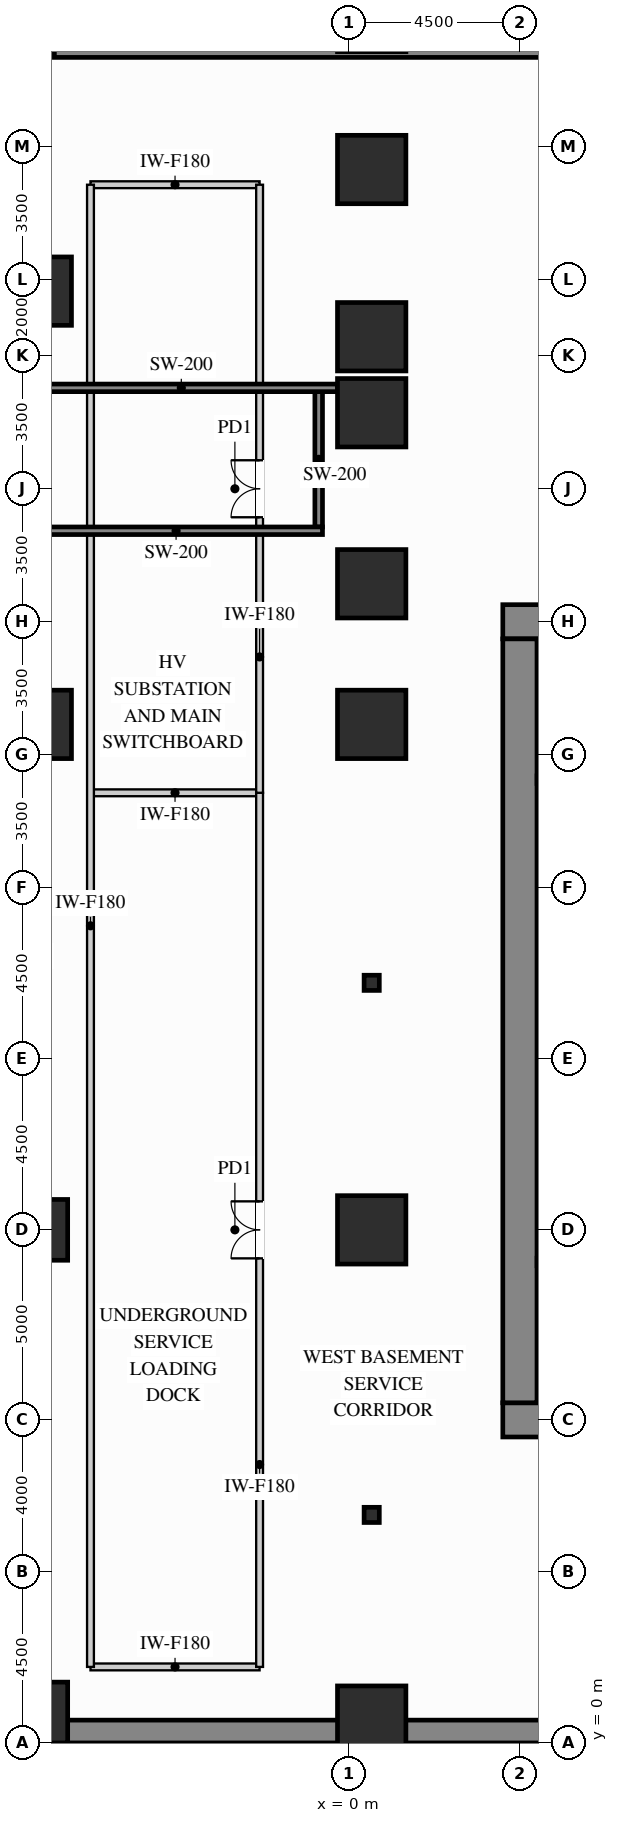
"""IFC4 building model, lengths in metres.
Left out: names, types, materials, properties, quantities, classifications, styles, units other than length and angle.
Written with IfcOpenShell. Run it as: python <this file> out.ifc"""

import sys

from ifc_helpers import new_model, si_unit, direction, frame, frame_2d, origin, origin_2d, place, context, subcontext, project, spatial, rectangle, hollow_rectangle, extrude, source, transform, mapped, element, fill, save


model = new_model("IFC4")
c1 = context("Model", 3, precision=1e-05, world=origin(), true_north=direction((0.0, 1.0)))
c2 = subcontext(c1, "Body", "Model", "MODEL_VIEW")
j1 = project(units=[si_unit("LENGTHUNIT", "METRE"), si_unit("PLANEANGLEUNIT", "RADIAN")], contexts=[c1])
p1 = place(None, origin())
s1 = spatial("IfcSite", under=j1, at=p1, CompositionType="ELEMENT")
p2 = place(p1, origin())
s2 = spatial("IfcBuilding", under=s1, at=p2, CompositionType="ELEMENT")
p3 = place(p2, frame((0.0, 0.0, -4.5)))
s3 = spatial("IfcBuildingStorey", under=s2, at=p3, CompositionType="ELEMENT", Elevation=-4.5)
m1 = source(origin(), c2, "Body", "SweptSolid", [
    extrude(rectangle(XDim=1.6, YDim=1.6, at=origin_2d()), origin(), (0.0, 0.0, 1.0), 4.24),
])
for number, where, z_axis, x_axis in (
    (1, (-8.2, 0.8, 0.0), (0.0, 0.0, 1.0), (1.0, 0.0, 0.0)),
    (2, (-8.2, 13.5, 0.0), (0.0, 0.0, 1.0), (1.0, 0.0, 0.0)),
):
    element("IfcColumn", number, at=place(p3, frame(where, z_axis=z_axis, x_axis=x_axis)), inside=s3, PredefinedType="COLUMN", context=c2, shape_type="MappedRepresentation", body=[
        mapped(m1, transform((0.0, 0.0, 0.0), x_axis=(1.0, 0.0, 0.0), y_axis=(0.0, 1.0, 0.0), z_axis=(0.0, 0.0, 1.0))),
    ])
m2 = source(origin(), c2, "Body", "SweptSolid", [
    extrude(rectangle(XDim=1.8, YDim=1.8, at=origin_2d()), origin(), (0.0, 0.0, 1.0), 4.24),
])
for number, where, z_axis, x_axis in (
    (3, (-8.2, 26.8, 0.0), (0.0, 0.0, 1.0), (1.0, 0.0, 0.0)),
    (4, (-8.2, 38.2, 0.0), (0.0, 0.0, 1.0), (1.0, 0.0, 0.0)),
    (5, (0.6, 0.6, 0.0), (0.0, 0.0, 1.0), (1.0, 0.0, 0.0)),
    (6, (0.6, 13.5, 0.0), (0.0, 0.0, 1.0), (1.0, 0.0, 0.0)),
    (7, (0.6, 26.8, 0.0), (0.0, 0.0, 1.0), (1.0, 0.0, 0.0)),
    (8, (0.6, 30.5, 0.0), (0.0, 0.0, 1.0), (1.0, 0.0, 0.0)),
    (9, (0.6, 35.0, 0.0), (0.0, 0.0, 1.0), (1.0, 0.0, 0.0)),
    (10, (0.6, 37.0, 0.0), (0.0, 0.0, 1.0), (1.0, 0.0, 0.0)),
    (11, (0.6, 41.4, 0.0), (0.0, 0.0, 1.0), (1.0, 0.0, 0.0)),
    (12, (0.6, 45.4, 0.0), (0.0, 0.0, 1.0), (1.0, 0.0, 0.0)),
):
    element("IfcColumn", number, at=place(p3, frame(where, z_axis=z_axis, x_axis=x_axis)), inside=s3, PredefinedType="COLUMN", context=c2, shape_type="MappedRepresentation", body=[
        mapped(m2, transform((0.0, 0.0, 0.0), x_axis=(1.0, 0.0, 0.0), y_axis=(0.0, 1.0, 0.0), z_axis=(0.0, 0.0, 1.0))),
    ])
m3 = source(origin(), c2, "Body", "SweptSolid", [
    extrude(hollow_rectangle(XDim=0.4, YDim=0.4, WallThickness=0.02, at=origin_2d()), origin(), (0.0, 0.0, 1.0), 4.24),
])
for number, where, z_axis, x_axis in (
    (13, (0.6, 6.0, 0.0), (0.0, 0.0, 1.0), (1.0, 0.0, 0.0)),
    (14, (0.6, 20.0, 0.0), (0.0, 0.0, 1.0), (1.0, 0.0, 0.0)),
):
    element("IfcColumn", number, at=place(p3, frame(where, z_axis=z_axis, x_axis=x_axis)), inside=s3, PredefinedType="PILASTER", context=c2, shape_type="MappedRepresentation", body=[
        mapped(m3, transform((0.0, 0.0, 0.0), x_axis=(1.0, 0.0, 0.0), y_axis=(0.0, 1.0, 0.0), z_axis=(0.0, 0.0, 1.0))),
    ])
m4 = source(origin(), c2, "Body", "SweptSolid", [
    extrude(rectangle(XDim=10.9, YDim=0.9, at=frame_2d((5.45, 0.0))), origin(), (0.0, 0.0, 1.0), 4.24),
])
for number, where, z_axis, x_axis in (
    (15, (4.05, 29.5, 0.0), (0.0, 0.0, 1.0), (1.0, 0.0, 0.0)),
    (16, (4.05, 8.5, 0.0), (0.0, 0.0, 1.0), (1.0, 0.0, 0.0)),
):
    element("IfcWall", number, at=place(p3, frame(where, z_axis=z_axis, x_axis=x_axis)), inside=s3, PredefinedType="SHEAR", context=c2, shape_type="MappedRepresentation", body=[
        mapped(m4, transform((0.0, 0.0, 0.0), x_axis=(1.0, 0.0, 0.0), y_axis=(0.0, 1.0, 0.0), z_axis=(0.0, 0.0, 1.0))),
    ])
m5 = source(origin(), c2, "Body", "SweptSolid", [
    extrude(rectangle(XDim=20.1, YDim=0.9, at=frame_2d((10.05, 0.0))), origin(), (0.0, 0.0, 1.0), 4.24),
])
p4 = place(p3, frame((4.5, 8.95, 0.0), z_axis=(0.0, 0.0, 1.0), x_axis=(0.0, 1.0, 0.0)))
e17 = element("IfcWall", 17, at=p4, inside=s3, PredefinedType="SHEAR", context=c2, shape_type="MappedRepresentation", body=[
    mapped(m5, transform((0.0, 0.0, 0.0), x_axis=(1.0, 0.0, 0.0), y_axis=(0.0, 1.0, 0.0), z_axis=(0.0, 0.0, 1.0))),
])
m6 = source(origin(), c2, "Body", "SweptSolid", [
    extrude(rectangle(XDim=4.45, YDim=0.18, at=frame_2d((2.225, 0.0))), origin(), (0.0, 0.0, 1.0), 4.225),
])
for number, where, z_axis, x_axis in (
    (18, (-6.8, 25.0, 0.0), (0.0, 0.0, 1.0), (1.0, 0.0, 0.0)),
    (19, (-6.8, 41.0, 0.0), (0.0, 0.0, 1.0), (1.0, 0.0, 0.0)),
    (20, (-6.8, 2.0, 0.0), (0.0, 0.0, 1.0), (1.0, 0.0, 0.0)),
):
    element("IfcWall", number, at=place(p3, frame(where, z_axis=z_axis, x_axis=x_axis)), inside=s3, PredefinedType="PARTITIONING", context=c2, shape_type="MappedRepresentation", body=[
        mapped(m6, transform((0.0, 0.0, 0.0), x_axis=(1.0, 0.0, 0.0), y_axis=(0.0, 1.0, 0.0), z_axis=(0.0, 0.0, 1.0))),
    ])
p5 = place(p3, frame((-2.35, 2.0, 0.0), z_axis=(0.0, 0.0, 1.0), x_axis=(0.0, 1.0, 0.0)))
e21 = element("IfcWall", 21, at=p5, inside=s3, PredefinedType="PARTITIONING", context=c2, shape_type="SweptSolid", body=[
    extrude(rectangle(XDim=23.0, YDim=0.18, at=frame_2d((11.5, 0.0))), origin(), (0.0, 0.0, 1.0), 4.225),
])
p6 = place(p5, frame((10.75, 0.0, 0.0)))
e22 = element("IfcOpeningElement", 22, at=p6, cuts=e21, PredefinedType="OPENING", context=c2, shape_type="SweptSolid", body=[
    extrude(rectangle(XDim=1.5, YDim=2.2, at=frame_2d((0.75, 1.1))), frame((0.0, 0.1, 0.0), z_axis=(0.0, -1.0, 0.0), x_axis=(1.0, 0.0, 0.0)), (0.0, 0.0, 1.0), 0.2),
])
p7 = place(p3, frame((-2.35, 25.0, 0.0), z_axis=(0.0, 0.0, 1.0), x_axis=(0.0, 1.0, 0.0)))
e23 = element("IfcWall", 23, at=p7, inside=s3, PredefinedType="PARTITIONING", context=c2, shape_type="SweptSolid", body=[
    extrude(rectangle(XDim=16.0, YDim=0.18, at=frame_2d((8.0, 0.0))), origin(), (0.0, 0.0, 1.0), 4.225),
])
p8 = place(p7, frame((7.25, 0.0, 0.0)))
e24 = element("IfcOpeningElement", 24, at=p8, cuts=e23, PredefinedType="OPENING", context=c2, shape_type="SweptSolid", body=[
    extrude(rectangle(XDim=1.5, YDim=2.2, at=frame_2d((0.75, 1.1))), frame((0.0, 0.1, 0.0), z_axis=(0.0, -1.0, 0.0), x_axis=(1.0, 0.0, 0.0)), (0.0, 0.0, 1.0), 0.2),
])
m7 = source(origin(), c2, "Body", "SweptSolid", [
    extrude(rectangle(XDim=39.0, YDim=0.18, at=frame_2d((19.5, 0.0))), origin(), (0.0, 0.0, 1.0), 4.225),
])
p9 = place(p3, frame((-6.8, 2.0, 0.0), z_axis=(0.0, 0.0, 1.0), x_axis=(0.0, 1.0, 0.0)))
e25 = element("IfcWall", 25, at=p9, inside=s3, PredefinedType="PARTITIONING", context=c2, shape_type="MappedRepresentation", body=[
    mapped(m7, transform((0.0, 0.0, 0.0), x_axis=(1.0, 0.0, 0.0), y_axis=(0.0, 1.0, 0.0), z_axis=(0.0, 0.0, 1.0))),
])
m8 = source(origin(), c2, "Body", "SweptSolid", [
    extrude(rectangle(XDim=2.17, YDim=0.18, at=frame_2d((1.085, 0.0))), origin(), (0.0, 0.0, 1.0), 4.225),
])
p10 = place(p3, frame((4.98, 20.92, 0.0), z_axis=(0.0, 0.0, 1.0), x_axis=(1.0, 0.0, 0.0)))
e26 = element("IfcWall", 26, at=p10, inside=s3, PredefinedType="PARTITIONING", context=c2, shape_type="MappedRepresentation", body=[
    mapped(m8, transform((0.0, 0.0, 0.0), x_axis=(1.0, 0.0, 0.0), y_axis=(0.0, 1.0, 0.0), z_axis=(0.0, 0.0, 1.0))),
])
m9 = source(origin(), c2, "Body", "SweptSolid", [
    extrude(rectangle(XDim=84.0, YDim=0.6, at=frame_2d((42.0, 0.0))), origin(), (0.0, 0.0, 1.0), 4.24),
])
p11 = place(p3, frame((-9.0, 0.3, 0.0), z_axis=(0.0, 0.0, 1.0), x_axis=(1.0, 0.0, 0.0)))
e27 = element("IfcWall", 27, at=p11, inside=s3, PredefinedType="USERDEFINED", context=c2, shape_type="MappedRepresentation", body=[
    mapped(m9, transform((0.0, 0.0, 0.0), x_axis=(1.0, 0.0, 0.0), y_axis=(0.0, 1.0, 0.0), z_axis=(0.0, 0.0, 1.0))),
])
p12 = place(p3, frame((4.952, 12.655, 0.0), z_axis=(0.0, 0.0, 1.0), x_axis=(1.0, 0.0, 0.0)))
e28 = element("IfcWall", 28, at=p12, inside=s3, PredefinedType="SHEAR", context=c2, shape_type="SweptSolid", body=[
    extrude(rectangle(XDim=7.453, YDim=0.2, at=frame_2d((3.727, 0.0))), origin(), (0.0, 0.0, 1.0), 4.24),
])
p13 = place(p12, frame((0.4, 0.0, 0.0)))
e29 = element("IfcOpeningElement", 29, at=p13, cuts=e28, PredefinedType="OPENING", context=c2, shape_type="SweptSolid", body=[
    extrude(rectangle(XDim=1.1, YDim=2.15, at=frame_2d((0.55, 1.075))), frame((0.0, 0.11, 0.0), z_axis=(0.0, -1.0, 0.0), x_axis=(1.0, 0.0, 0.0)), (0.0, 0.0, 1.0), 0.22),
])
p14 = place(p3, frame((4.952, 25.345, 0.0), z_axis=(0.0, 0.0, 1.0), x_axis=(1.0, 0.0, 0.0)))
e30 = element("IfcWall", 30, at=p14, inside=s3, PredefinedType="SHEAR", context=c2, shape_type="SweptSolid", body=[
    extrude(rectangle(XDim=7.453, YDim=0.2, at=frame_2d((3.727, 0.0))), origin(), (0.0, 0.0, 1.0), 4.24),
])
p15 = place(p14, frame((0.4, 0.0, 0.0)))
e31 = element("IfcOpeningElement", 31, at=p15, cuts=e30, PredefinedType="OPENING", context=c2, shape_type="SweptSolid", body=[
    extrude(rectangle(XDim=1.1, YDim=2.15, at=frame_2d((0.55, 1.075))), frame((0.0, 0.11, 0.0), z_axis=(0.0, -1.0, 0.0), x_axis=(1.0, 0.0, 0.0)), (0.0, 0.0, 1.0), 0.22),
])
m10 = source(origin(), c2, "Body", "SweptSolid", [
    extrude(rectangle(XDim=3.56, YDim=0.2, at=frame_2d((1.78, 0.0))), origin(), (0.0, 0.0, 1.0), 4.24),
])
p16 = place(p3, frame((-0.795, 31.995, 0.0), z_axis=(0.0, 0.0, 1.0), x_axis=(0.0, 1.0, 0.0)))
e32 = element("IfcWall", 32, at=p16, inside=s3, PredefinedType="SHEAR", context=c2, shape_type="MappedRepresentation", body=[
    mapped(m10, transform((0.0, 0.0, 0.0), x_axis=(1.0, 0.0, 0.0), y_axis=(0.0, 1.0, 0.0), z_axis=(0.0, 0.0, 1.0))),
])
m11 = source(origin(), c2, "Body", "SweptSolid", [
    extrude(rectangle(XDim=8.1, YDim=0.2, at=frame_2d((4.05, 0.0))), origin(), (0.0, 0.0, 1.0), 4.24),
])
p17 = place(p3, frame((-8.4, 35.655, 0.0), z_axis=(0.0, 0.0, 1.0), x_axis=(1.0, 0.0, 0.0)))
e33 = element("IfcWall", 33, at=p17, inside=s3, PredefinedType="SHEAR", context=c2, shape_type="MappedRepresentation", body=[
    mapped(m11, transform((0.0, 0.0, 0.0), x_axis=(1.0, 0.0, 0.0), y_axis=(0.0, 1.0, 0.0), z_axis=(0.0, 0.0, 1.0))),
])
m12 = source(origin(), c2, "Body", "SweptSolid", [
    extrude(rectangle(XDim=7.705, YDim=0.2, at=frame_2d((3.853, 0.0))), origin(), (0.0, 0.0, 1.0), 4.24),
])
p18 = place(p3, frame((-8.4, 31.895, 0.0), z_axis=(0.0, 0.0, 1.0), x_axis=(1.0, 0.0, 0.0)))
e34 = element("IfcWall", 34, at=p18, inside=s3, PredefinedType="SHEAR", context=c2, shape_type="MappedRepresentation", body=[
    mapped(m12, transform((0.0, 0.0, 0.0), x_axis=(1.0, 0.0, 0.0), y_axis=(0.0, 1.0, 0.0), z_axis=(0.0, 0.0, 1.0))),
])
m13 = source(origin(), c2, "Body", "SweptSolid", [
    extrude(rectangle(XDim=34.3, YDim=0.3, at=frame_2d((17.15, 0.0))), origin(), (0.0, 0.0, 1.0), 4.2),
])
p19 = place(p3, frame((-7.75, 44.5, 0.0), z_axis=(0.0, 0.0, 1.0), x_axis=(1.0, 0.0, 0.0)))
e35 = element("IfcWall", 35, at=p19, inside=s3, PredefinedType="SHEAR", context=c2, shape_type="MappedRepresentation", body=[
    mapped(m13, transform((0.0, 0.0, 0.0), x_axis=(1.0, 0.0, 0.0), y_axis=(0.0, 1.0, 0.0), z_axis=(0.0, 0.0, 1.0))),
])
m14 = source(origin(), c2, "Body", "SweptSolid", [
    extrude(rectangle(XDim=1.5, YDim=2.2, at=frame_2d((0.75, 1.1))), frame((0.0, 0.025, 0.0), z_axis=(0.0, -1.0, 0.0), x_axis=(1.0, 0.0, 0.0)), (0.0, 0.0, 1.0), 0.05),
])
p20 = place(p6, origin())
e36 = element("IfcDoor", 36, at=p20, inside=s3, OperationType="DOUBLE_DOOR_SINGLE_SWING", PredefinedType="DOOR", context=c2, shape_type="MappedRepresentation", body=[
    mapped(m14, transform((0.0, 0.0, 0.0), x_axis=(1.0, 0.0, 0.0), y_axis=(0.0, 1.0, 0.0), z_axis=(0.0, 0.0, 1.0))),
])
fill(e22, e36)
p21 = place(p8, origin())
e37 = element("IfcDoor", 37, at=p21, inside=s3, OperationType="DOUBLE_DOOR_SINGLE_SWING", PredefinedType="DOOR", context=c2, shape_type="MappedRepresentation", body=[
    mapped(m14, transform((0.0, 0.0, 0.0), x_axis=(1.0, 0.0, 0.0), y_axis=(0.0, 1.0, 0.0), z_axis=(0.0, 0.0, 1.0))),
])
fill(e24, e37)
save(model, sys.argv[1])
